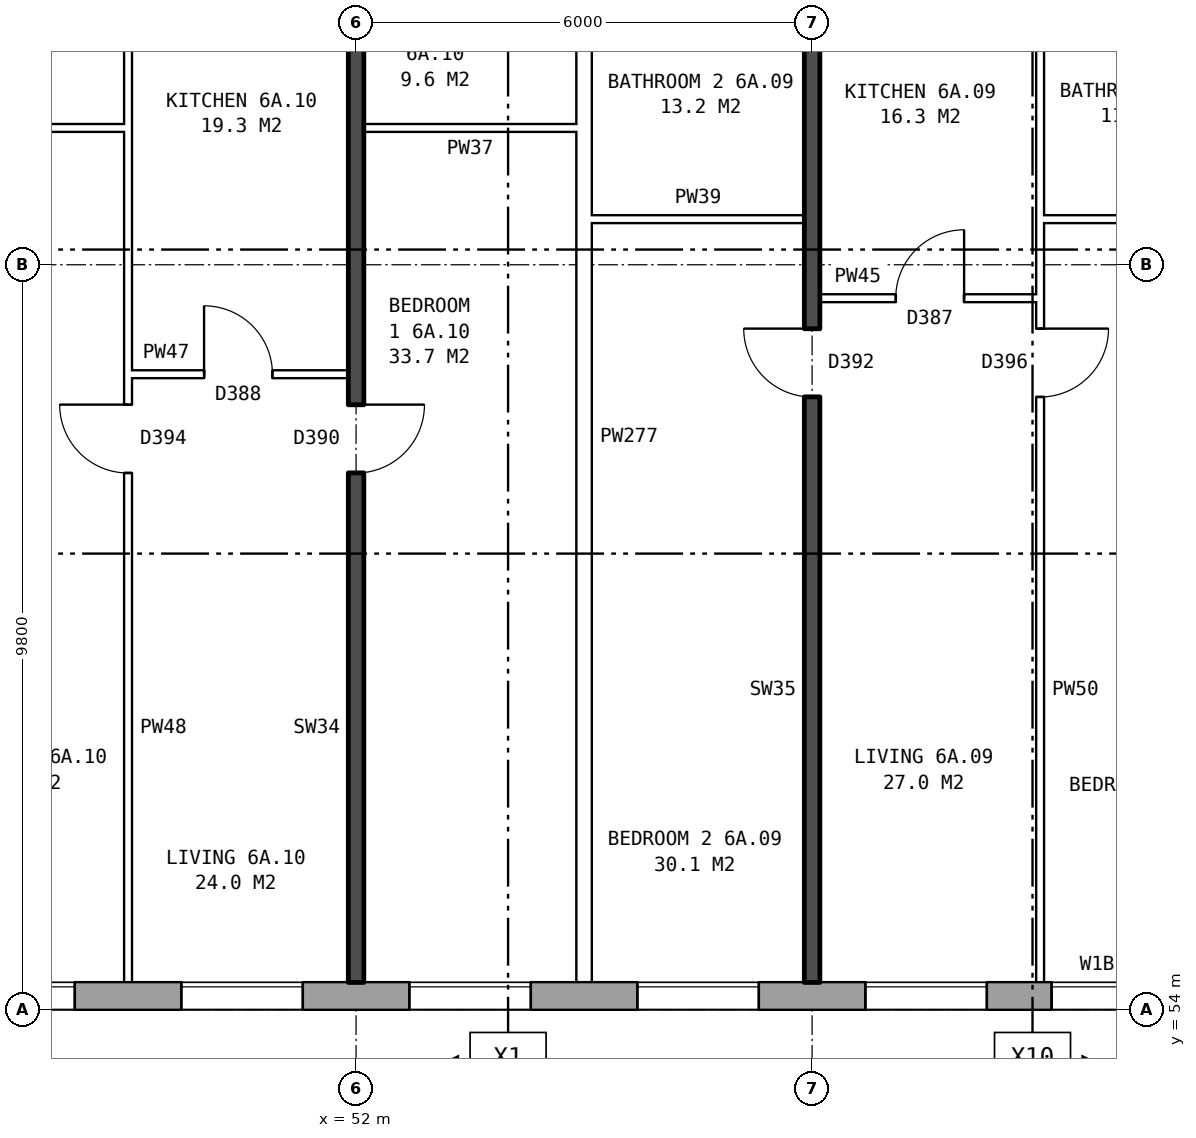
"""IFC4 building model, lengths in metres.
Left out: names, types, materials, properties, quantities, classifications, styles, units other than length and angle.
Written with IfcOpenShell. Run it as: python <this file> out.ifc"""

import sys

from ifc_helpers import new_model, si_unit, direction, frame, frame_2d, origin, place, context, subcontext, project, spatial, rectangle, extrude, element, fill, save


model = new_model("IFC4")
c1 = context("Model", 3, precision=1e-05, world=origin(), true_north=direction((0.0, 1.0)))
c2 = subcontext(c1, "Body", "Model", "MODEL_VIEW")
j1 = project(units=[si_unit("LENGTHUNIT", "METRE"), si_unit("PLANEANGLEUNIT", "RADIAN")], contexts=[c1])
p1 = place(None, origin())
s1 = spatial("IfcSite", under=j1, at=p1, CompositionType="ELEMENT")
p2 = place(p1, origin())
s2 = spatial("IfcBuilding", under=s1, at=p2, CompositionType="ELEMENT")
p3 = place(p2, frame((0.0, 0.0, 25.7)))
s3 = spatial("IfcBuildingStorey", under=s2, at=p3, CompositionType="ELEMENT", Elevation=25.7)
p4 = place(p3, frame((22.825, 54.18, 0.0), z_axis=(0.0, 0.0, 1.0), x_axis=(1.0, 0.0, 0.0)))
e1 = element("IfcWall", 1, at=p4, inside=s3, PredefinedType="STANDARD", context=c2, shape_type="SweptSolid", body=[
    extrude(rectangle(XDim=50.101, YDim=0.36, at=frame_2d((25.05, 0.0))), origin(), (0.0, 0.0, 1.0), 2.85),
])
p5 = place(p4, frame((2.875, 0.0, 0.8)))
e2 = element("IfcOpeningElement", 2, at=p5, cuts=e1, PredefinedType="OPENING", context=c2, shape_type="SweptSolid", body=[
    extrude(rectangle(XDim=1.6, YDim=1.8, at=frame_2d((0.8, 0.9))), frame((0.0, 0.19, 0.0), z_axis=(0.0, -1.0, 0.0), x_axis=(1.0, 0.0, 0.0)), (0.0, 0.0, 1.0), 0.38),
])
p6 = place(p4, frame((5.875, 0.0, 0.8)))
e3 = element("IfcOpeningElement", 3, at=p6, cuts=e1, PredefinedType="OPENING", context=c2, shape_type="SweptSolid", body=[
    extrude(rectangle(XDim=1.6, YDim=1.8, at=frame_2d((0.8, 0.9))), frame((0.0, 0.19, 0.0), z_axis=(0.0, -1.0, 0.0), x_axis=(1.0, 0.0, 0.0)), (0.0, 0.0, 1.0), 0.38),
])
p7 = place(p4, frame((7.775, 0.0, 1.6)))
e4 = element("IfcOpeningElement", 4, at=p7, cuts=e1, PredefinedType="OPENING", context=c2, shape_type="SweptSolid", body=[
    extrude(rectangle(XDim=0.8, YDim=0.9, at=frame_2d((0.4, 0.45))), frame((0.0, 0.19, 0.0), z_axis=(0.0, -1.0, 0.0), x_axis=(1.0, 0.0, 0.0)), (0.0, 0.0, 1.0), 0.38),
])
p8 = place(p4, frame((11.875, 0.0, 0.8)))
e5 = element("IfcOpeningElement", 5, at=p8, cuts=e1, PredefinedType="OPENING", context=c2, shape_type="SweptSolid", body=[
    extrude(rectangle(XDim=1.6, YDim=1.8, at=frame_2d((0.8, 0.9))), frame((0.0, 0.19, 0.0), z_axis=(0.0, -1.0, 0.0), x_axis=(1.0, 0.0, 0.0)), (0.0, 0.0, 1.0), 0.38),
])
p9 = place(p4, frame((14.875, 0.0, 0.8)))
e6 = element("IfcOpeningElement", 6, at=p9, cuts=e1, PredefinedType="OPENING", context=c2, shape_type="SweptSolid", body=[
    extrude(rectangle(XDim=1.6, YDim=1.8, at=frame_2d((0.8, 0.9))), frame((0.0, 0.19, 0.0), z_axis=(0.0, -1.0, 0.0), x_axis=(1.0, 0.0, 0.0)), (0.0, 0.0, 1.0), 0.38),
])
p10 = place(p4, frame((17.875, 0.0, 0.8)))
e7 = element("IfcOpeningElement", 7, at=p10, cuts=e1, PredefinedType="OPENING", context=c2, shape_type="SweptSolid", body=[
    extrude(rectangle(XDim=1.6, YDim=1.8, at=frame_2d((0.8, 0.9))), frame((0.0, 0.19, 0.0), z_axis=(0.0, -1.0, 0.0), x_axis=(1.0, 0.0, 0.0)), (0.0, 0.0, 1.0), 0.38),
])
p11 = place(p4, frame((20.875, 0.0, 0.8)))
e8 = element("IfcOpeningElement", 8, at=p11, cuts=e1, PredefinedType="OPENING", context=c2, shape_type="SweptSolid", body=[
    extrude(rectangle(XDim=1.6, YDim=1.8, at=frame_2d((0.8, 0.9))), frame((0.0, 0.19, 0.0), z_axis=(0.0, -1.0, 0.0), x_axis=(1.0, 0.0, 0.0)), (0.0, 0.0, 1.0), 0.38),
])
p12 = place(p4, frame((23.875, 0.0, 0.8)))
e9 = element("IfcOpeningElement", 9, at=p12, cuts=e1, PredefinedType="OPENING", context=c2, shape_type="SweptSolid", body=[
    extrude(rectangle(XDim=1.6, YDim=1.8, at=frame_2d((0.8, 0.9))), frame((0.0, 0.19, 0.0), z_axis=(0.0, -1.0, 0.0), x_axis=(1.0, 0.0, 0.0)), (0.0, 0.0, 1.0), 0.38),
])
p13 = place(p4, frame((26.875, 0.0, 0.8)))
e10 = element("IfcOpeningElement", 10, at=p13, cuts=e1, PredefinedType="OPENING", context=c2, shape_type="SweptSolid", body=[
    extrude(rectangle(XDim=1.6, YDim=1.8, at=frame_2d((0.8, 0.9))), frame((0.0, 0.19, 0.0), z_axis=(0.0, -1.0, 0.0), x_axis=(1.0, 0.0, 0.0)), (0.0, 0.0, 1.0), 0.38),
])
p14 = place(p4, frame((29.875, 0.0, 0.8)))
e11 = element("IfcOpeningElement", 11, at=p14, cuts=e1, PredefinedType="OPENING", context=c2, shape_type="SweptSolid", body=[
    extrude(rectangle(XDim=1.6, YDim=1.8, at=frame_2d((0.8, 0.9))), frame((0.0, 0.19, 0.0), z_axis=(0.0, -1.0, 0.0), x_axis=(1.0, 0.0, 0.0)), (0.0, 0.0, 1.0), 0.38),
])
p15 = place(p4, frame((32.875, 0.0, 0.8)))
e12 = element("IfcOpeningElement", 12, at=p15, cuts=e1, PredefinedType="OPENING", context=c2, shape_type="SweptSolid", body=[
    extrude(rectangle(XDim=1.6, YDim=1.8, at=frame_2d((0.8, 0.9))), frame((0.0, 0.19, 0.0), z_axis=(0.0, -1.0, 0.0), x_axis=(1.0, 0.0, 0.0)), (0.0, 0.0, 1.0), 0.38),
])
p16 = place(p4, frame((35.875, 0.0, 0.8)))
e13 = element("IfcOpeningElement", 13, at=p16, cuts=e1, PredefinedType="OPENING", context=c2, shape_type="SweptSolid", body=[
    extrude(rectangle(XDim=1.6, YDim=1.8, at=frame_2d((0.8, 0.9))), frame((0.0, 0.19, 0.0), z_axis=(0.0, -1.0, 0.0), x_axis=(1.0, 0.0, 0.0)), (0.0, 0.0, 1.0), 0.38),
])
p17 = place(p4, frame((38.325, 0.0, 0.15)))
e14 = element("IfcOpeningElement", 14, at=p17, cuts=e1, PredefinedType="OPENING", context=c2, shape_type="SweptSolid", body=[
    extrude(rectangle(XDim=1.2, YDim=1.8, at=frame_2d((0.6, 0.9))), frame((0.0, 0.19, 0.0), z_axis=(0.0, -1.0, 0.0), x_axis=(1.0, 0.0, 0.0)), (0.0, 0.0, 1.0), 0.38),
])
p18 = place(p4, frame((41.825, 0.0, 1.4)))
e15 = element("IfcOpeningElement", 15, at=p18, cuts=e1, PredefinedType="OPENING", context=c2, shape_type="SweptSolid", body=[
    extrude(rectangle(XDim=1.0, YDim=1.2, at=frame_2d((0.5, 0.6))), frame((0.0, 0.19, 0.0), z_axis=(0.0, -1.0, 0.0), x_axis=(1.0, 0.0, 0.0)), (0.0, 0.0, 1.0), 0.38),
])
p19 = place(p4, frame((44.875, 0.0, 0.8)))
e16 = element("IfcOpeningElement", 16, at=p19, cuts=e1, PredefinedType="OPENING", context=c2, shape_type="SweptSolid", body=[
    extrude(rectangle(XDim=1.6, YDim=1.8, at=frame_2d((0.8, 0.9))), frame((0.0, 0.19, 0.0), z_axis=(0.0, -1.0, 0.0), x_axis=(1.0, 0.0, 0.0)), (0.0, 0.0, 1.0), 0.38),
])
p20 = place(p4, frame((47.875, 0.0, 0.8)))
e17 = element("IfcOpeningElement", 17, at=p20, cuts=e1, PredefinedType="OPENING", context=c2, shape_type="SweptSolid", body=[
    extrude(rectangle(XDim=1.6, YDim=1.8, at=frame_2d((0.8, 0.9))), frame((0.0, 0.19, 0.0), z_axis=(0.0, -1.0, 0.0), x_axis=(1.0, 0.0, 0.0)), (0.0, 0.0, 1.0), 0.38),
])
p21 = place(p4, frame((10.175, 0.0, 0.8)))
e18 = element("IfcOpeningElement", 18, at=p21, cuts=e1, PredefinedType="OPENING", context=c2, shape_type="SweptSolid", body=[
    extrude(rectangle(XDim=0.8, YDim=0.9, at=frame_2d((0.4, 0.45))), frame((0.0, 0.19, 0.0), z_axis=(0.0, -1.0, 0.0), x_axis=(1.0, 0.0, 0.0)), (0.0, 0.0, 1.0), 0.38),
])
p22 = place(p4, frame((39.825, 0.0, 0.15)))
e19 = element("IfcOpeningElement", 19, at=p22, cuts=e1, PredefinedType="OPENING", context=c2, shape_type="SweptSolid", body=[
    extrude(rectangle(XDim=1.0, YDim=0.9, at=frame_2d((0.5, 0.45))), frame((0.0, 0.19, 0.0), z_axis=(0.0, -1.0, 0.0), x_axis=(1.0, 0.0, 0.0)), (0.0, 0.0, 1.0), 0.38),
])
p23 = place(p4, frame((43.125, 0.0, 0.8)))
e20 = element("IfcOpeningElement", 20, at=p23, cuts=e1, PredefinedType="OPENING", context=c2, shape_type="SweptSolid", body=[
    extrude(rectangle(XDim=1.4, YDim=1.8, at=frame_2d((0.7, 0.9))), frame((0.0, 0.19, 0.0), z_axis=(0.0, -1.0, 0.0), x_axis=(1.0, 0.0, 0.0)), (0.0, 0.0, 1.0), 0.38),
])
p24 = place(p3, frame((49.0, 62.36, 0.0), z_axis=(0.0, 0.0, 1.0), x_axis=(1.0, 0.0, 0.0)))
e21 = element("IfcWall", 21, at=p24, inside=s3, PredefinedType="PARTITIONING", context=c2, shape_type="SweptSolid", body=[
    extrude(rectangle(XDim=2.9, YDim=0.1, at=frame_2d((1.45, 0.0))), origin(), (0.0, 0.0, 1.0), 2.85),
])
p25 = place(p24, frame((1.0, 0.0, 0.0)))
e22 = element("IfcOpeningElement", 22, at=p25, cuts=e21, PredefinedType="OPENING", context=c2, shape_type="SweptSolid", body=[
    extrude(rectangle(XDim=0.9, YDim=2.1, at=frame_2d((0.45, 1.05))), frame((0.0, 0.06, 0.0), z_axis=(0.0, -1.0, 0.0), x_axis=(1.0, 0.0, 0.0)), (0.0, 0.0, 1.0), 0.12),
])
p26 = place(p3, frame((58.1, 63.36, 0.0), z_axis=(0.0, 0.0, 1.0), x_axis=(1.0, 0.0, 0.0)))
e23 = element("IfcWall", 23, at=p26, inside=s3, PredefinedType="PARTITIONING", context=c2, shape_type="SweptSolid", body=[
    extrude(rectangle(XDim=2.9, YDim=0.1, at=frame_2d((1.45, 0.0))), origin(), (0.0, 0.0, 1.0), 2.85),
])
p27 = place(p26, frame((1.0, 0.0, 0.0)))
e24 = element("IfcOpeningElement", 24, at=p27, cuts=e23, PredefinedType="OPENING", context=c2, shape_type="SweptSolid", body=[
    extrude(rectangle(XDim=0.9, YDim=2.1, at=frame_2d((0.45, 1.05))), frame((0.0, 0.06, 0.0), z_axis=(0.0, -1.0, 0.0), x_axis=(1.0, 0.0, 0.0)), (0.0, 0.0, 1.0), 0.12),
])
p28 = place(p3, frame((55.1, 64.4, 0.0), z_axis=(0.0, 0.0, 1.0), x_axis=(1.0, 0.0, 0.0)))
e25 = element("IfcWall", 25, at=p28, inside=s3, PredefinedType="PARTITIONING", context=c2, shape_type="SweptSolid", body=[
    extrude(rectangle(XDim=2.8, YDim=0.1, at=frame_2d((1.4, 0.0))), origin(), (0.0, 0.0, 1.0), 2.85),
])
p29 = place(p3, frame((61.0, 64.4, 0.0), z_axis=(0.0, 0.0, 1.0), x_axis=(1.0, 0.0, 0.0)))
e26 = element("IfcWall", 26, at=p29, inside=s3, PredefinedType="PARTITIONING", context=c2, shape_type="SweptSolid", body=[
    extrude(rectangle(XDim=2.64, YDim=0.1, at=frame_2d((1.32, 0.0))), origin(), (0.0, 0.0, 1.0), 2.85),
])
p30 = place(p3, frame((46.1, 65.6, 0.0), z_axis=(0.0, 0.0, 1.0), x_axis=(1.0, 0.0, 0.0)))
e27 = element("IfcWall", 27, at=p30, inside=s3, PredefinedType="PARTITIONING", context=c2, shape_type="SweptSolid", body=[
    extrude(rectangle(XDim=2.9, YDim=0.1, at=frame_2d((1.45, 0.0))), origin(), (0.0, 0.0, 1.0), 2.85),
])
p31 = place(p3, frame((52.1, 65.6, 0.0), z_axis=(0.0, 0.0, 1.0), x_axis=(1.0, 0.0, 0.0)))
e28 = element("IfcWall", 28, at=p31, inside=s3, PredefinedType="PARTITIONING", context=c2, shape_type="SweptSolid", body=[
    extrude(rectangle(XDim=2.8, YDim=0.1, at=frame_2d((1.4, 0.0))), origin(), (0.0, 0.0, 1.0), 2.85),
])
p32 = place(p3, frame((49.0, 54.36, 0.0), z_axis=(0.0, 0.0, 1.0), x_axis=(0.0, 1.0, 0.0)))
e29 = element("IfcWall", 29, at=p32, inside=s3, PredefinedType="PARTITIONING", context=c2, shape_type="SweptSolid", body=[
    extrude(rectangle(XDim=14.34, YDim=0.1, at=frame_2d((7.17, 0.0))), origin(), (0.0, 0.0, 1.0), 2.85),
])
p33 = place(p32, frame((6.7, 0.0, 0.0)))
e30 = element("IfcOpeningElement", 30, at=p33, cuts=e29, PredefinedType="OPENING", context=c2, shape_type="SweptSolid", body=[
    extrude(rectangle(XDim=0.9, YDim=2.1, at=frame_2d((0.45, 1.05))), frame((0.0, 0.06, 0.0), z_axis=(0.0, -1.0, 0.0), x_axis=(1.0, 0.0, 0.0)), (0.0, 0.0, 1.0), 0.12),
])
p34 = place(p32, frame((13.04, 0.0, 0.0)))
e31 = element("IfcOpeningElement", 31, at=p34, cuts=e29, PredefinedType="OPENING", context=c2, shape_type="SweptSolid", body=[
    extrude(rectangle(XDim=0.9, YDim=2.1, at=frame_2d((0.45, 1.05))), frame((0.0, 0.06, 0.0), z_axis=(0.0, -1.0, 0.0), x_axis=(1.0, 0.0, 0.0)), (0.0, 0.0, 1.0), 0.12),
])
p35 = place(p3, frame((52.0, 54.36, 0.0), z_axis=(0.0, 0.0, 1.0), x_axis=(0.0, 1.0, 0.0)))
e32 = element("IfcWall", 32, at=p35, inside=s3, PredefinedType="SOLIDWALL", context=c2, shape_type="SweptSolid", body=[
    extrude(rectangle(XDim=14.44, YDim=0.2, at=frame_2d((7.22, 0.0))), origin(), (0.0, 0.0, 1.0), 2.85),
])
p36 = place(p35, frame((6.7, 0.0, 0.0)))
e33 = element("IfcOpeningElement", 33, at=p36, cuts=e32, PredefinedType="OPENING", context=c2, shape_type="SweptSolid", body=[
    extrude(rectangle(XDim=0.9, YDim=2.1, at=frame_2d((0.45, 1.05))), frame((0.0, 0.11, 0.0), z_axis=(0.0, -1.0, 0.0), x_axis=(1.0, 0.0, 0.0)), (0.0, 0.0, 1.0), 0.22),
])
p37 = place(p35, frame((13.14, 0.0, 0.0)))
e34 = element("IfcOpeningElement", 34, at=p37, cuts=e32, PredefinedType="OPENING", context=c2, shape_type="SweptSolid", body=[
    extrude(rectangle(XDim=0.9, YDim=2.1, at=frame_2d((0.45, 1.05))), frame((0.0, 0.11, 0.0), z_axis=(0.0, -1.0, 0.0), x_axis=(1.0, 0.0, 0.0)), (0.0, 0.0, 1.0), 0.22),
])
p38 = place(p3, frame((55.0, 54.36, 0.0), z_axis=(0.0, 0.0, 1.0), x_axis=(0.0, 1.0, 0.0)))
e35 = element("IfcWall", 35, at=p38, inside=s3, PredefinedType="PARTITIONING", context=c2, shape_type="SweptSolid", body=[
    extrude(rectangle(XDim=14.34, YDim=0.2, at=frame_2d((7.17, 0.0))), origin(), (0.0, 0.0, 1.0), 2.85),
])
p39 = place(p3, frame((58.0, 54.36, 0.0), z_axis=(0.0, 0.0, 1.0), x_axis=(0.0, 1.0, 0.0)))
e36 = element("IfcWall", 36, at=p39, inside=s3, PredefinedType="SOLIDWALL", context=c2, shape_type="SweptSolid", body=[
    extrude(rectangle(XDim=14.44, YDim=0.2, at=frame_2d((7.22, 0.0))), origin(), (0.0, 0.0, 1.0), 2.85),
])
p40 = place(p39, frame((7.7, 0.0, 0.0)))
e37 = element("IfcOpeningElement", 37, at=p40, cuts=e36, PredefinedType="OPENING", context=c2, shape_type="SweptSolid", body=[
    extrude(rectangle(XDim=0.9, YDim=2.1, at=frame_2d((0.45, 1.05))), frame((0.0, 0.11, 0.0), z_axis=(0.0, -1.0, 0.0), x_axis=(1.0, 0.0, 0.0)), (0.0, 0.0, 1.0), 0.22),
])
p41 = place(p39, frame((13.14, 0.0, 0.0)))
e38 = element("IfcOpeningElement", 38, at=p41, cuts=e36, PredefinedType="OPENING", context=c2, shape_type="SweptSolid", body=[
    extrude(rectangle(XDim=0.9, YDim=2.1, at=frame_2d((0.45, 1.05))), frame((0.0, 0.11, 0.0), z_axis=(0.0, -1.0, 0.0), x_axis=(1.0, 0.0, 0.0)), (0.0, 0.0, 1.0), 0.22),
])
p42 = place(p3, frame((61.0, 54.36, 0.0), z_axis=(0.0, 0.0, 1.0), x_axis=(0.0, 1.0, 0.0)))
e39 = element("IfcWall", 39, at=p42, inside=s3, PredefinedType="PARTITIONING", context=c2, shape_type="SweptSolid", body=[
    extrude(rectangle(XDim=14.34, YDim=0.1, at=frame_2d((7.17, 0.0))), origin(), (0.0, 0.0, 1.0), 2.85),
])
p43 = place(p42, frame((7.7, 0.0, 0.0)))
e40 = element("IfcOpeningElement", 40, at=p43, cuts=e39, PredefinedType="OPENING", context=c2, shape_type="SweptSolid", body=[
    extrude(rectangle(XDim=0.9, YDim=2.1, at=frame_2d((0.45, 1.05))), frame((0.0, 0.06, 0.0), z_axis=(0.0, -1.0, 0.0), x_axis=(1.0, 0.0, 0.0)), (0.0, 0.0, 1.0), 0.12),
])
p44 = place(p42, frame((13.04, 0.0, 0.0)))
e41 = element("IfcOpeningElement", 41, at=p44, cuts=e39, PredefinedType="OPENING", context=c2, shape_type="SweptSolid", body=[
    extrude(rectangle(XDim=0.9, YDim=2.1, at=frame_2d((0.45, 1.05))), frame((0.0, 0.06, 0.0), z_axis=(0.0, -1.0, 0.0), x_axis=(1.0, 0.0, 0.0)), (0.0, 0.0, 1.0), 0.12),
])
p45 = place(p12, origin())
e42 = element("IfcWindow", 42, at=p45, inside=s3, PartitioningType="SINGLE_PANEL", PredefinedType="WINDOW", context=c2, shape_type="SweptSolid", body=[
    extrude(rectangle(XDim=1.6, YDim=1.8, at=frame_2d((0.8, 0.9))), frame((0.0, 0.15, 0.0), z_axis=(0.0, -1.0, 0.0), x_axis=(1.0, 0.0, 0.0)), (0.0, 0.0, 1.0), 0.06),
])
fill(e9, e42)
p46 = place(p13, origin())
e43 = element("IfcWindow", 43, at=p46, inside=s3, PartitioningType="SINGLE_PANEL", PredefinedType="WINDOW", context=c2, shape_type="SweptSolid", body=[
    extrude(rectangle(XDim=1.6, YDim=1.8, at=frame_2d((0.8, 0.9))), frame((0.0, 0.15, 0.0), z_axis=(0.0, -1.0, 0.0), x_axis=(1.0, 0.0, 0.0)), (0.0, 0.0, 1.0), 0.06),
])
fill(e10, e43)
p47 = place(p14, origin())
e44 = element("IfcWindow", 44, at=p47, inside=s3, PartitioningType="SINGLE_PANEL", PredefinedType="WINDOW", context=c2, shape_type="SweptSolid", body=[
    extrude(rectangle(XDim=1.6, YDim=1.8, at=frame_2d((0.8, 0.9))), frame((0.0, 0.15, 0.0), z_axis=(0.0, -1.0, 0.0), x_axis=(1.0, 0.0, 0.0)), (0.0, 0.0, 1.0), 0.06),
])
fill(e11, e44)
p48 = place(p15, origin())
e45 = element("IfcWindow", 45, at=p48, inside=s3, PartitioningType="SINGLE_PANEL", PredefinedType="WINDOW", context=c2, shape_type="SweptSolid", body=[
    extrude(rectangle(XDim=1.6, YDim=1.8, at=frame_2d((0.8, 0.9))), frame((0.0, 0.15, 0.0), z_axis=(0.0, -1.0, 0.0), x_axis=(1.0, 0.0, 0.0)), (0.0, 0.0, 1.0), 0.06),
])
fill(e12, e45)
p49 = place(p16, origin())
e46 = element("IfcWindow", 46, at=p49, inside=s3, PartitioningType="SINGLE_PANEL", PredefinedType="WINDOW", context=c2, shape_type="SweptSolid", body=[
    extrude(rectangle(XDim=1.6, YDim=1.8, at=frame_2d((0.8, 0.9))), frame((0.0, 0.15, 0.0), z_axis=(0.0, -1.0, 0.0), x_axis=(1.0, 0.0, 0.0)), (0.0, 0.0, 1.0), 0.06),
])
fill(e13, e46)
p50 = place(p17, origin())
e47 = element("IfcWindow", 47, at=p50, inside=s3, PartitioningType="SINGLE_PANEL", PredefinedType="WINDOW", context=c2, shape_type="SweptSolid", body=[
    extrude(rectangle(XDim=1.2, YDim=1.8, at=frame_2d((0.6, 0.9))), frame((0.0, 0.15, 0.0), z_axis=(0.0, -1.0, 0.0), x_axis=(1.0, 0.0, 0.0)), (0.0, 0.0, 1.0), 0.06),
])
fill(e14, e47)
p51 = place(p43, frame((0.9, 0.0, 0.0), z_axis=(0.0, 0.0, 1.0), x_axis=(-1.0, 0.0, 0.0)))
e48 = element("IfcDoor", 48, at=p51, inside=s3, OperationType="SINGLE_SWING_LEFT", PredefinedType="DOOR", context=c2, shape_type="SweptSolid", body=[
    extrude(rectangle(XDim=0.9, YDim=2.1, at=frame_2d((0.45, 1.05))), frame((0.0, 0.025, 0.0), z_axis=(0.0, -1.0, 0.0), x_axis=(1.0, 0.0, 0.0)), (0.0, 0.0, 1.0), 0.05),
])
fill(e40, e48)
p52 = place(p40, origin())
e49 = element("IfcDoor", 49, at=p52, inside=s3, OperationType="SINGLE_SWING_RIGHT", PredefinedType="DOOR", context=c2, shape_type="SweptSolid", body=[
    extrude(rectangle(XDim=0.9, YDim=2.1, at=frame_2d((0.45, 1.05))), frame((0.0, 0.025, 0.0), z_axis=(0.0, -1.0, 0.0), x_axis=(1.0, 0.0, 0.0)), (0.0, 0.0, 1.0), 0.05),
])
fill(e37, e49)
p53 = place(p27, origin())
e50 = element("IfcDoor", 50, at=p53, inside=s3, OperationType="SINGLE_SWING_RIGHT", PredefinedType="DOOR", context=c2, shape_type="SweptSolid", body=[
    extrude(rectangle(XDim=0.9, YDim=2.1, at=frame_2d((0.45, 1.05))), frame((0.0, 0.025, 0.0), z_axis=(0.0, -1.0, 0.0), x_axis=(1.0, 0.0, 0.0)), (0.0, 0.0, 1.0), 0.05),
])
fill(e24, e50)
p54 = place(p36, frame((0.9, 0.0, 0.0), z_axis=(0.0, 0.0, 1.0), x_axis=(-1.0, 0.0, 0.0)))
e51 = element("IfcDoor", 51, at=p54, inside=s3, OperationType="SINGLE_SWING_LEFT", PredefinedType="DOOR", context=c2, shape_type="SweptSolid", body=[
    extrude(rectangle(XDim=0.9, YDim=2.1, at=frame_2d((0.45, 1.05))), frame((0.0, 0.025, 0.0), z_axis=(0.0, -1.0, 0.0), x_axis=(1.0, 0.0, 0.0)), (0.0, 0.0, 1.0), 0.05),
])
fill(e33, e51)
p55 = place(p33, origin())
e52 = element("IfcDoor", 52, at=p55, inside=s3, OperationType="SINGLE_SWING_RIGHT", PredefinedType="DOOR", context=c2, shape_type="SweptSolid", body=[
    extrude(rectangle(XDim=0.9, YDim=2.1, at=frame_2d((0.45, 1.05))), frame((0.0, 0.025, 0.0), z_axis=(0.0, -1.0, 0.0), x_axis=(1.0, 0.0, 0.0)), (0.0, 0.0, 1.0), 0.05),
])
fill(e30, e52)
p56 = place(p25, origin())
e53 = element("IfcDoor", 53, at=p56, inside=s3, OperationType="SINGLE_SWING_LEFT", PredefinedType="DOOR", context=c2, shape_type="SweptSolid", body=[
    extrude(rectangle(XDim=0.9, YDim=2.1, at=frame_2d((0.45, 1.05))), frame((0.0, 0.025, 0.0), z_axis=(0.0, -1.0, 0.0), x_axis=(1.0, 0.0, 0.0)), (0.0, 0.0, 1.0), 0.05),
])
fill(e22, e53)
save(model, sys.argv[1])
